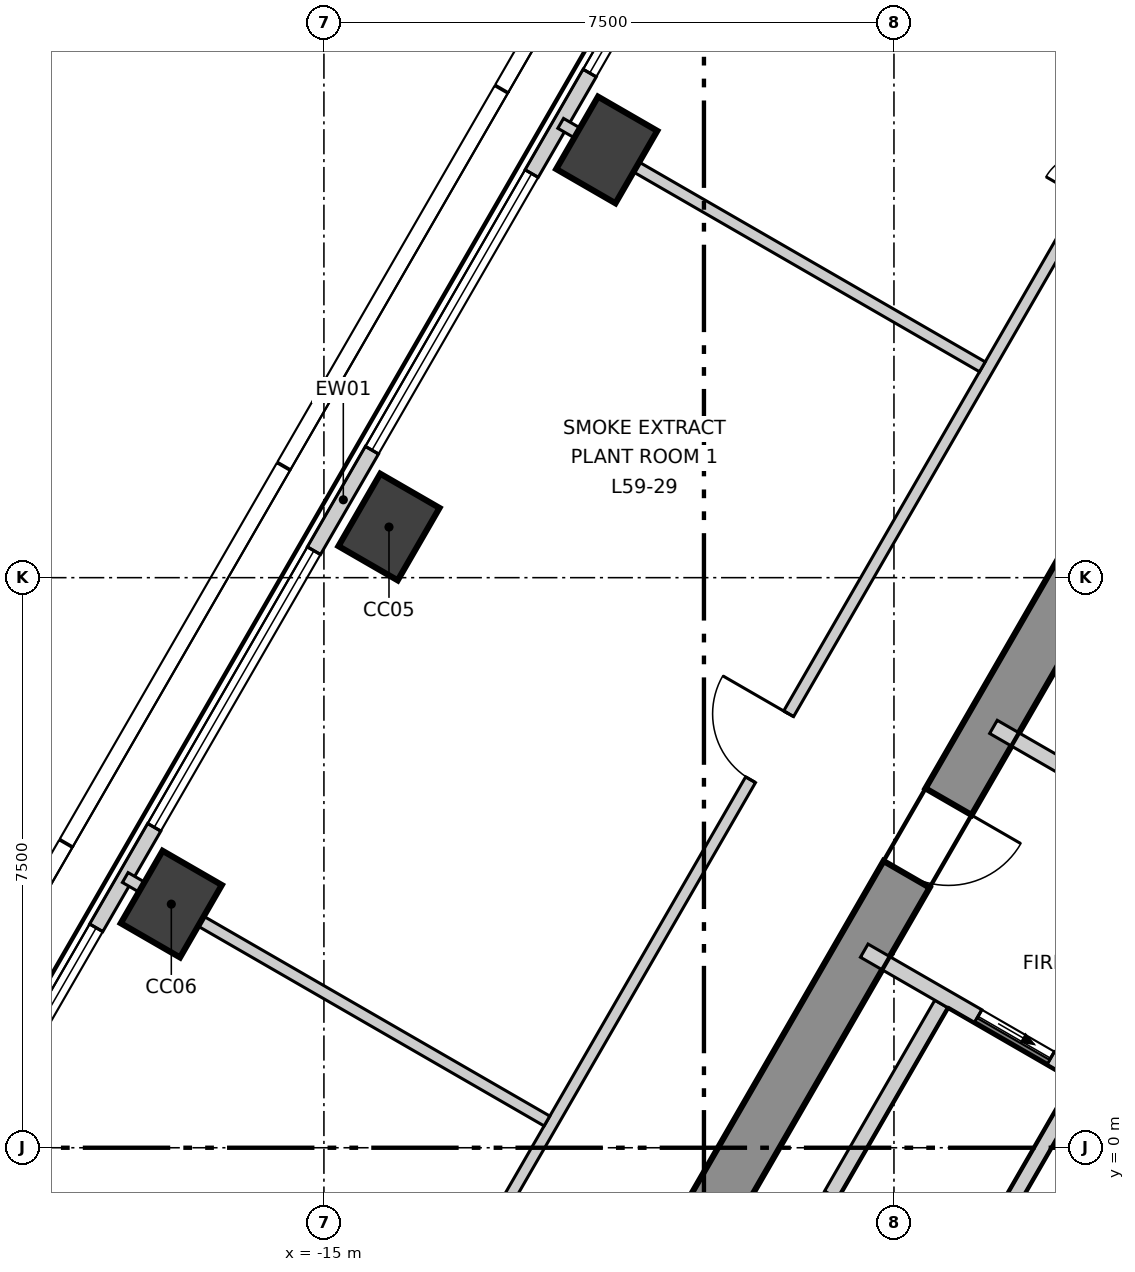
"""IFC4 building model, lengths in metres.
Left out: names, types, materials, properties, quantities, classifications, styles, units other than length and angle.
Written with IfcOpenShell. Run it as: python <this file> out.ifc"""

import sys

from ifc_helpers import new_model, si_unit, direction, frame, frame_2d, origin, origin_2d, place, context, subcontext, project, spatial, polyline, rectangle, outline, extrude, element, fill, save


model = new_model("IFC4")
c1 = context("Model", 3, precision=1e-05, world=origin(), true_north=direction((0.0, 1.0)))
c2 = subcontext(c1, "Body", "Model", "MODEL_VIEW")
j1 = project(units=[si_unit("LENGTHUNIT", "METRE"), si_unit("PLANEANGLEUNIT", "RADIAN")], contexts=[c1])
p1 = place(None, origin())
s1 = spatial("IfcSite", under=j1, at=p1, CompositionType="ELEMENT")
p2 = place(p1, origin())
s2 = spatial("IfcBuilding", under=s1, at=p2, CompositionType="ELEMENT")
p3 = place(p2, frame((0.0, 0.0, 251.3)))
s3 = spatial("IfcBuildingStorey", under=s2, at=p3, CompositionType="ELEMENT", Elevation=251.3)
p4 = place(p3, frame((-1.703, 13.35, -0.3), z_axis=(0.0, 0.0, 1.0), x_axis=(-0.500011533395, -0.866018744874, 0.0)))
e1 = element("IfcWall", 1, at=p4, inside=s3, PredefinedType="SHEAR", context=c2, shape_type="SweptSolid", body=[
    extrude(outline(polyline([(-0.202, -0.35), (1.782, -0.35), (3.766, -0.35), (5.75, -0.35), (7.734, -0.35), (9.718, -0.35), (11.702, -0.35), (13.686, -0.35), (15.67, -0.35), (17.654, -0.35), (19.638, -0.35), (21.622, -0.35), (21.218, 0.35), (19.307, 0.35), (17.397, 0.35), (15.486, 0.35), (13.576, 0.35), (11.665, 0.35), (9.755, 0.35), (7.844, 0.35), (5.934, 0.35), (4.023, 0.35), (2.113, 0.35), (0.202, 0.35), (-0.202, -0.35)])), origin(), (0.0, 0.0, 1.0), 4.2),
])
p5 = place(p4, frame((10.16, 0.0, 0.3)))
e2 = element("IfcOpeningElement", 2, at=p5, cuts=e1, PredefinedType="OPENING", context=c2, shape_type="SweptSolid", body=[
    extrude(rectangle(XDim=1.1, YDim=2.1, at=frame_2d((0.55, 1.05))), frame((0.0, 0.36, 0.0), z_axis=(0.0, -1.0, 0.0), x_axis=(1.0, 0.0, 0.0)), (0.0, 0.0, 1.0), 0.72),
])
for number, where, z_axis, x_axis in (
    (3, (-11.279, 13.127, -0.3), (0.0, 0.0, 1.0), (0.5, 0.866, 0.0)),
    (4, (-14.144, 8.166, -0.3), (0.0, 0.0, 1.0), (0.5, 0.866, 0.0)),
    (5, (-17.008, 3.205, -0.3), (0.0, 0.0, 1.0), (0.5, 0.866, 0.0)),
):
    element("IfcColumn", number, at=place(p3, frame(where, z_axis=z_axis, x_axis=x_axis)), inside=s3, PredefinedType="COLUMN", context=c2, shape_type="SweptSolid", body=[
        extrude(rectangle(XDim=1.1, YDim=0.9, at=origin_2d()), origin(), (0.0, 0.0, 1.0), 4.2),
    ])
p6 = place(p3, frame((-2.641, 29.489, 0.0), z_axis=(0.0, 0.0, 1.0), x_axis=(-0.500004868955, -0.866022592674, 0.0)))
e6 = element("IfcWall", 6, at=p6, inside=s3, PredefinedType="ELEMENTEDWALL", context=c2, shape_type="SweptSolid", body=[
    extrude(rectangle(XDim=48.416, YDim=0.2, at=frame_2d((24.208, 0.0))), origin(), (0.0, 0.0, 1.0), 3.9),
])
p7 = place(p6, frame((2.067, 0.0, 0.9)))
e7 = element("IfcOpeningElement", 7, at=p7, cuts=e6, PredefinedType="OPENING", context=c2, shape_type="SweptSolid", body=[
    extrude(rectangle(XDim=4.2, YDim=2.5, at=frame_2d((2.1, 1.25))), frame((0.0, 0.11, 0.0), z_axis=(0.0, -1.0, 0.0), x_axis=(1.0, 0.0, 0.0)), (0.0, 0.0, 1.0), 0.22),
])
p8 = place(p6, frame((7.796, 0.0, 0.9)))
e8 = element("IfcOpeningElement", 8, at=p8, cuts=e6, PredefinedType="OPENING", context=c2, shape_type="SweptSolid", body=[
    extrude(rectangle(XDim=4.2, YDim=2.5, at=frame_2d((2.1, 1.25))), frame((0.0, 0.11, 0.0), z_axis=(0.0, -1.0, 0.0), x_axis=(1.0, 0.0, 0.0)), (0.0, 0.0, 1.0), 0.22),
])
p9 = place(p6, frame((13.524, 0.0, 0.9)))
e9 = element("IfcOpeningElement", 9, at=p9, cuts=e6, PredefinedType="OPENING", context=c2, shape_type="SweptSolid", body=[
    extrude(rectangle(XDim=4.2, YDim=2.5, at=frame_2d((2.1, 1.25))), frame((0.0, 0.11, 0.0), z_axis=(0.0, -1.0, 0.0), x_axis=(1.0, 0.0, 0.0)), (0.0, 0.0, 1.0), 0.22),
])
p10 = place(p6, frame((19.253, 0.0, 0.9)))
e10 = element("IfcOpeningElement", 10, at=p10, cuts=e6, PredefinedType="OPENING", context=c2, shape_type="SweptSolid", body=[
    extrude(rectangle(XDim=4.2, YDim=2.5, at=frame_2d((2.1, 1.25))), frame((0.0, 0.11, 0.0), z_axis=(0.0, -1.0, 0.0), x_axis=(1.0, 0.0, 0.0)), (0.0, 0.0, 1.0), 0.22),
])
p11 = place(p6, frame((24.982, 0.0, 0.9)))
e11 = element("IfcOpeningElement", 11, at=p11, cuts=e6, PredefinedType="OPENING", context=c2, shape_type="SweptSolid", body=[
    extrude(rectangle(XDim=4.2, YDim=2.5, at=frame_2d((2.1, 1.25))), frame((0.0, 0.11, 0.0), z_axis=(0.0, -1.0, 0.0), x_axis=(1.0, 0.0, 0.0)), (0.0, 0.0, 1.0), 0.22),
])
p12 = place(p6, frame((30.711, 0.0, 0.9)))
e12 = element("IfcOpeningElement", 12, at=p12, cuts=e6, PredefinedType="OPENING", context=c2, shape_type="SweptSolid", body=[
    extrude(rectangle(XDim=4.2, YDim=2.5, at=frame_2d((2.1, 1.25))), frame((0.0, 0.11, 0.0), z_axis=(0.0, -1.0, 0.0), x_axis=(1.0, 0.0, 0.0)), (0.0, 0.0, 1.0), 0.22),
])
p13 = place(p6, frame((36.439, 0.0, 0.9)))
e13 = element("IfcOpeningElement", 13, at=p13, cuts=e6, PredefinedType="OPENING", context=c2, shape_type="SweptSolid", body=[
    extrude(rectangle(XDim=4.2, YDim=2.5, at=frame_2d((2.1, 1.25))), frame((0.0, 0.11, 0.0), z_axis=(0.0, -1.0, 0.0), x_axis=(1.0, 0.0, 0.0)), (0.0, 0.0, 1.0), 0.22),
])
p14 = place(p6, frame((42.168, 0.0, 0.9)))
e14 = element("IfcOpeningElement", 14, at=p14, cuts=e6, PredefinedType="OPENING", context=c2, shape_type="SweptSolid", body=[
    extrude(rectangle(XDim=4.2, YDim=2.5, at=frame_2d((2.1, 1.25))), frame((0.0, 0.11, 0.0), z_axis=(0.0, -1.0, 0.0), x_axis=(1.0, 0.0, 0.0)), (0.0, 0.0, 1.0), 0.22),
])
p15 = place(p3, frame((-15.184, -5.2, 0.0), z_axis=(0.0, 0.0, 1.0), x_axis=(0.499984831513, 0.866034161138, 0.0)))
e15 = element("IfcWall", 15, at=p15, inside=s3, PredefinedType="PARTITIONING", context=c2, shape_type="SweptSolid", body=[
    extrude(rectangle(XDim=24.191, YDim=0.15, at=frame_2d((12.095, 0.0))), origin(), (0.0, 0.0, 1.0), 3.9),
])
p16 = place(p15, frame((20.408, 0.0, 0.0)))
e16 = element("IfcOpeningElement", 16, at=p16, cuts=e15, PredefinedType="OPENING", context=c2, shape_type="SweptSolid", body=[
    extrude(rectangle(XDim=1.2, YDim=2.1, at=frame_2d((0.6, 1.05))), frame((0.0, 0.085, 0.0), z_axis=(0.0, -1.0, 0.0), x_axis=(1.0, 0.0, 0.0)), (0.0, 0.0, 1.0), 0.17),
])
p17 = place(p15, frame((11.596, 0.0, 0.0)))
e17 = element("IfcOpeningElement", 17, at=p17, cuts=e15, PredefinedType="OPENING", context=c2, shape_type="SweptSolid", body=[
    extrude(rectangle(XDim=1.0, YDim=2.1, at=frame_2d((0.5, 1.05))), frame((0.0, 0.085, 0.0), z_axis=(0.0, -1.0, 0.0), x_axis=(1.0, 0.0, 0.0)), (0.0, 0.0, 1.0), 0.17),
])
p18 = place(p15, frame((2.584, 0.0, 0.0)))
e18 = element("IfcOpeningElement", 18, at=p18, cuts=e15, PredefinedType="OPENING", context=c2, shape_type="SweptSolid", body=[
    extrude(rectangle(XDim=1.2, YDim=2.1, at=frame_2d((0.6, 1.05))), frame((0.0, 0.085, 0.0), z_axis=(0.0, -1.0, 0.0), x_axis=(1.0, 0.0, 0.0)), (0.0, 0.0, 1.0), 0.17),
])
for number, where, z_axis, x_axis in (
    (19, (-17.614, 3.555, 0.0), (0.0, 0.0, 1.0), (0.866, -0.5, 0.0)),
    (20, (-11.885, 13.477, 0.0), (0.0, 0.0, 1.0), (0.866, -0.5, 0.0)),
):
    element("IfcWall", number, at=place(p3, frame(where, z_axis=z_axis, x_axis=x_axis)), inside=s3, PredefinedType="PARTITIONING", context=c2, shape_type="SweptSolid", body=[
        extrude(rectangle(XDim=6.406, YDim=0.15, at=frame_2d((3.203, 0.0))), origin(), (0.0, 0.0, 1.0), 3.9),
    ])
p19 = place(p3, frame((-8.326, -0.62, 0.0), z_axis=(0.0, 0.0, 1.0), x_axis=(0.500023687443, 0.866011727401, 0.0)))
e21 = element("IfcWall", 21, at=p19, inside=s3, PredefinedType="SOLIDWALL", context=c2, shape_type="SweptSolid", body=[
    extrude(rectangle(XDim=2.9, YDim=0.2, at=frame_2d((1.45, 0.0))), origin(), (0.0, 0.0, 1.0), 3.9),
])
p20 = place(p3, frame((-7.891, 2.593, 0.0), z_axis=(0.0, 0.0, 1.0), x_axis=(0.866070917804, -0.499921159118, 0.0)))
e22 = element("IfcWall", 22, at=p20, inside=s3, PredefinedType="SOLIDWALL", context=c2, shape_type="SweptSolid", body=[
    extrude(rectangle(XDim=3.333, YDim=0.2, at=frame_2d((1.666, 0.0))), origin(), (0.0, 0.0, 1.0), 3.9),
])
p21 = place(p20, frame((1.73, 0.0, 0.0)))
e23 = element("IfcOpeningElement", 23, at=p21, cuts=e22, PredefinedType="OPENING", context=c2, shape_type="SweptSolid", body=[
    extrude(rectangle(XDim=1.1, YDim=2.1, at=frame_2d((0.55, 1.05))), frame((0.0, 0.11, 0.0), z_axis=(0.0, -1.0, 0.0), x_axis=(1.0, 0.0, 0.0)), (0.0, 0.0, 1.0), 0.22),
])
p22 = place(p3, frame((-6.191, 5.537, 0.0), z_axis=(0.0, 0.0, 1.0), x_axis=(0.866052607023, -0.499952879648, 0.0)))
e24 = element("IfcWall", 24, at=p22, inside=s3, PredefinedType="SOLIDWALL", context=c2, shape_type="SweptSolid", body=[
    extrude(rectangle(XDim=3.332, YDim=0.2, at=frame_2d((1.666, 0.0))), origin(), (0.0, 0.0, 1.0), 3.9),
])
p23 = place(p22, frame((1.83, 0.0, 0.0)))
e25 = element("IfcOpeningElement", 25, at=p23, cuts=e24, PredefinedType="OPENING", context=c2, shape_type="SweptSolid", body=[
    extrude(rectangle(XDim=0.9, YDim=2.1, at=frame_2d((0.45, 1.05))), frame((0.0, 0.11, 0.0), z_axis=(0.0, -1.0, 0.0), x_axis=(1.0, 0.0, 0.0)), (0.0, 0.0, 1.0), 0.22),
])
p24 = place(p3, frame((-6.507, -1.67, 0.0), z_axis=(0.0, 0.0, 1.0), x_axis=(0.50012328804, 0.865954211699, 0.0)))
e26 = element("IfcWall", 26, at=p24, inside=s3, PredefinedType="SOLIDWALL", context=c2, shape_type="SweptSolid", body=[
    extrude(rectangle(XDim=2.9, YDim=0.2, at=frame_2d((1.45, 0.0))), origin(), (0.0, 0.0, 1.0), 3.9),
])
p25 = place(p9, origin())
e27 = element("IfcWindow", 27, at=p25, inside=s3, PartitioningType="SINGLE_PANEL", PredefinedType="WINDOW", context=c2, shape_type="SweptSolid", body=[
    extrude(rectangle(XDim=4.2, YDim=2.5, at=frame_2d((2.1, 1.25))), frame((0.0, 0.03, 0.0), z_axis=(0.0, -1.0, 0.0), x_axis=(1.0, 0.0, 0.0)), (0.0, 0.0, 1.0), 0.06),
])
fill(e9, e27)
p26 = place(p10, origin())
e28 = element("IfcWindow", 28, at=p26, inside=s3, PartitioningType="SINGLE_PANEL", PredefinedType="WINDOW", context=c2, shape_type="SweptSolid", body=[
    extrude(rectangle(XDim=4.2, YDim=2.5, at=frame_2d((2.1, 1.25))), frame((0.0, 0.03, 0.0), z_axis=(0.0, -1.0, 0.0), x_axis=(1.0, 0.0, 0.0)), (0.0, 0.0, 1.0), 0.06),
])
fill(e10, e28)
p27 = place(p11, origin())
e29 = element("IfcWindow", 29, at=p27, inside=s3, PartitioningType="SINGLE_PANEL", PredefinedType="WINDOW", context=c2, shape_type="SweptSolid", body=[
    extrude(rectangle(XDim=4.2, YDim=2.5, at=frame_2d((2.1, 1.25))), frame((0.0, 0.03, 0.0), z_axis=(0.0, -1.0, 0.0), x_axis=(1.0, 0.0, 0.0)), (0.0, 0.0, 1.0), 0.06),
])
fill(e11, e29)
p28 = place(p12, origin())
e30 = element("IfcWindow", 30, at=p28, inside=s3, PartitioningType="SINGLE_PANEL", PredefinedType="WINDOW", context=c2, shape_type="SweptSolid", body=[
    extrude(rectangle(XDim=4.2, YDim=2.5, at=frame_2d((2.1, 1.25))), frame((0.0, 0.03, 0.0), z_axis=(0.0, -1.0, 0.0), x_axis=(1.0, 0.0, 0.0)), (0.0, 0.0, 1.0), 0.06),
])
fill(e12, e30)
p29 = place(p21, origin())
e31 = element("IfcDoor", 31, at=p29, inside=s3, OperationType="SLIDING_TO_LEFT", PredefinedType="DOOR", context=c2, shape_type="SweptSolid", body=[
    extrude(rectangle(XDim=1.1, YDim=2.1, at=frame_2d((0.55, 1.05))), frame((0.0, 0.025, 0.0), z_axis=(0.0, -1.0, 0.0), x_axis=(1.0, 0.0, 0.0)), (0.0, 0.0, 1.0), 0.05),
])
fill(e23, e31)
p30 = place(p17, origin())
e32 = element("IfcDoor", 32, at=p30, inside=s3, OperationType="SINGLE_SWING_LEFT", PredefinedType="DOOR", context=c2, shape_type="SweptSolid", body=[
    extrude(rectangle(XDim=1.0, YDim=2.1, at=frame_2d((0.5, 1.05))), frame((0.0, 0.025, 0.0), z_axis=(0.0, -1.0, 0.0), x_axis=(1.0, 0.0, 0.0)), (0.0, 0.0, 1.0), 0.05),
])
fill(e17, e32)
p31 = place(p5, origin())
e33 = element("IfcDoor", 33, at=p31, inside=s3, OperationType="SINGLE_SWING_RIGHT", PredefinedType="DOOR", context=c2, shape_type="SweptSolid", body=[
    extrude(rectangle(XDim=1.1, YDim=2.1, at=frame_2d((0.55, 1.05))), frame((0.0, 0.025, 0.0), z_axis=(0.0, -1.0, 0.0), x_axis=(1.0, 0.0, 0.0)), (0.0, 0.0, 1.0), 0.05),
])
fill(e2, e33)
save(model, sys.argv[1])
